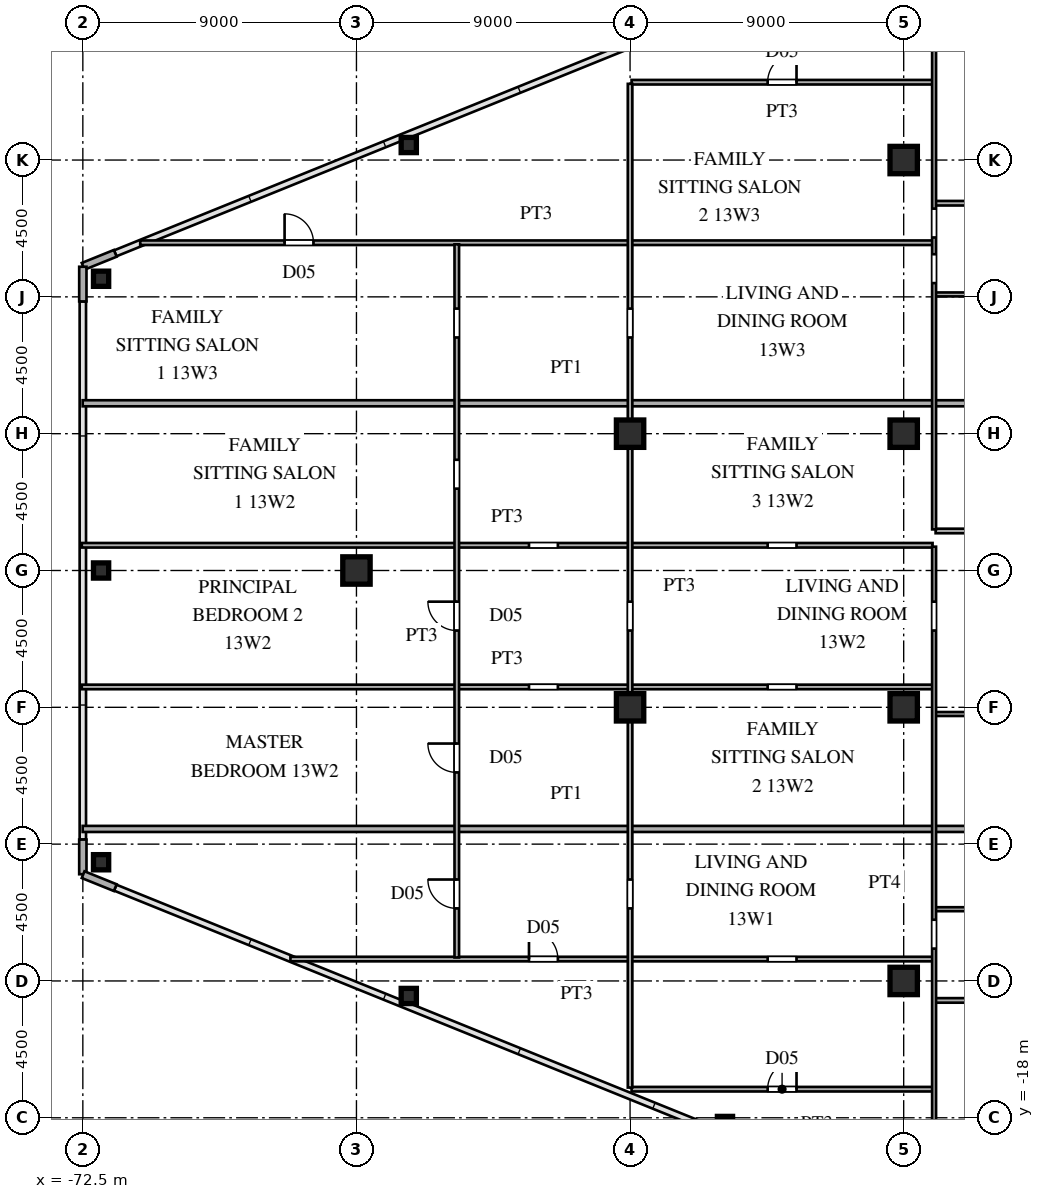
"""IFC4 building model, lengths in metres.
Left out: names, types, materials, properties, quantities, classifications, styles, units other than length and angle.
Written with IfcOpenShell. Run it as: python <this file> out.ifc"""

import sys

from ifc_helpers import new_model, si_unit, direction, frame, frame_2d, origin, origin_2d, place, context, subcontext, project, spatial, rectangle, hollow_rectangle, i_section, extrude, source, transform, mapped, element, fill, save


model = new_model("IFC4")
c1 = context("Model", 3, precision=1e-05, world=origin(), true_north=direction((0.0, 1.0)))
c2 = subcontext(c1, "Body", "Model", "MODEL_VIEW")
j1 = project(units=[si_unit("LENGTHUNIT", "METRE"), si_unit("PLANEANGLEUNIT", "RADIAN")], contexts=[c1])
p1 = place(None, origin())
s1 = spatial("IfcSite", under=j1, at=p1, CompositionType="ELEMENT")
p2 = place(p1, origin())
s2 = spatial("IfcBuilding", under=s1, at=p2, CompositionType="ELEMENT")
p3 = place(p2, frame((0.0, 0.0, 51.3)))
s3 = spatial("IfcBuildingStorey", under=s2, at=p3, CompositionType="ELEMENT", Elevation=51.3)
m1 = source(origin(), c2, "Body", "SweptSolid", [
    extrude(i_section(OverallWidth=0.9, OverallDepth=0.9, WebThickness=0.036, FlangeThickness=0.055, at=origin_2d()), origin(), (0.0, 0.0, 1.0), 3.6),
])
for number, where, z_axis, x_axis in (
    (1, (-45.5, -13.5, 0.0), (0.0, 0.0, 1.0), (1.0, 0.0, 0.0)),
    (2, (-45.5, -4.5, 0.0), (0.0, 0.0, 1.0), (1.0, 0.0, 0.0)),
    (3, (-45.5, 4.5, 0.0), (0.0, 0.0, 1.0), (1.0, 0.0, 0.0)),
    (4, (-45.5, 13.5, 0.0), (0.0, 0.0, 1.0), (1.0, 0.0, 0.0)),
    (5, (-54.5, -4.5, 0.0), (0.0, 0.0, 1.0), (1.0, 0.0, 0.0)),
    (6, (-54.5, 4.5, 0.0), (0.0, 0.0, 1.0), (1.0, 0.0, 0.0)),
    (7, (-63.5, 0.0, 0.0), (0.0, 0.0, 1.0), (1.0, 0.0, 0.0)),
):
    element("IfcColumn", number, at=place(p3, frame(where, z_axis=z_axis, x_axis=x_axis)), inside=s3, PredefinedType="COLUMN", context=c2, shape_type="MappedRepresentation", body=[
        mapped(m1, transform((0.0, 0.0, 0.0), scale=1.0)),
    ])
m2 = source(origin(), c2, "Body", "SweptSolid", [
    extrude(hollow_rectangle(XDim=0.5, YDim=0.5, WallThickness=0.02, at=origin_2d()), origin(), (0.0, 0.0, 1.0), 3.6),
])
for number, where, z_axis, x_axis in (
    (8, (-71.9, 9.596, 0.0), (0.0, 0.0, 1.0), (1.0, 0.0, 0.0)),
    (9, (-71.9, -9.596, 0.0), (0.0, 0.0, 1.0), (1.0, 0.0, 0.0)),
    (10, (-51.378, -18.204, 0.0), (0.0, 0.0, 1.0), (1.0, 0.0, 0.0)),
    (11, (-61.779, -13.994, 0.0), (0.0, 0.0, 1.0), (1.0, 0.0, 0.0)),
    (12, (-61.779, 13.994, 0.0), (0.0, 0.0, 1.0), (1.0, 0.0, 0.0)),
    (13, (-71.9, 0.0, 0.0), (0.0, 0.0, 1.0), (1.0, 0.0, 0.0)),
):
    element("IfcColumn", number, at=place(p3, frame(where, z_axis=z_axis, x_axis=x_axis)), inside=s3, PredefinedType="COLUMN", context=c2, shape_type="MappedRepresentation", body=[
        mapped(m2, transform((0.0, 0.0, 0.0), scale=1.0)),
    ])
for number, where, z_axis, x_axis in (
    (14, (-71.434, 10.431, 0.0), (0.0, 0.0, 1.0), (-0.927, -0.375, 0.0)),
    (15, (-72.5, 9.99, 0.0), (0.0, 0.0, 1.0), (0.0, -1.0, 0.0)),
    (16, (-72.5, -8.85, 0.0), (0.0, 0.0, 1.0), (0.0, -1.0, 0.0)),
    (17, (-72.491, -10.004, 0.0), (0.0, 0.0, 1.0), (0.927, -0.375, 0.0)),
):
    element("IfcWall", number, at=place(p3, frame(where, z_axis=z_axis, x_axis=x_axis)), inside=s3, PredefinedType="SOLIDWALL", context=c2, shape_type="SweptSolid", body=[
        extrude(rectangle(XDim=1.14, YDim=0.24, at=frame_2d((0.57, 0.0))), origin(), (0.0, 0.0, 1.0), 3.38),
    ])
p4 = place(p3, frame((-54.45, -17.06, 0.0), z_axis=(0.0, 0.0, 1.0), x_axis=(1.0, 0.0, 0.0)))
e18 = element("IfcWall", 18, at=p4, inside=s3, PredefinedType="PARTITIONING", context=c2, shape_type="SweptSolid", body=[
    extrude(rectangle(XDim=9.9, YDim=0.15, at=frame_2d((4.95, 0.0))), origin(), (0.0, 0.0, 1.0), 3.38),
])
p5 = place(p4, frame((4.475, 0.0, 0.0)))
e19 = element("IfcOpeningElement", 19, at=p5, cuts=e18, PredefinedType="OPENING", context=c2, shape_type="SweptSolid", body=[
    extrude(rectangle(XDim=0.95, YDim=2.15, at=frame_2d((0.475, 1.075))), frame((0.0, 0.085, 0.0), z_axis=(0.0, -1.0, 0.0), x_axis=(1.0, 0.0, 0.0)), (0.0, 0.0, 1.0), 0.17),
])
p6 = place(p3, frame((-44.45, -14.14, 0.0), z_axis=(0.0, 0.0, 1.0), x_axis=(1.0, 0.0, 0.0)))
e20 = element("IfcWall", 20, at=p6, inside=s3, PredefinedType="PARTITIONING", context=c2, shape_type="SweptSolid", body=[
    extrude(rectangle(XDim=6.1, YDim=0.15, at=frame_2d((3.05, 0.0))), origin(), (0.0, 0.0, 1.0), 3.38),
])
p7 = place(p6, frame((2.575, 0.0, 0.0)))
e21 = element("IfcOpeningElement", 21, at=p7, cuts=e20, PredefinedType="OPENING", context=c2, shape_type="SweptSolid", body=[
    extrude(rectangle(XDim=0.95, YDim=2.15, at=frame_2d((0.475, 1.075))), frame((0.0, 0.085, 0.0), z_axis=(0.0, -1.0, 0.0), x_axis=(1.0, 0.0, 0.0)), (0.0, 0.0, 1.0), 0.17),
])
p8 = place(p3, frame((-65.672, -12.78, 0.0), z_axis=(0.0, 0.0, 1.0), x_axis=(1.0, 0.0, 0.0)))
e22 = element("IfcWall", 22, at=p8, inside=s3, PredefinedType="PARTITIONING", context=c2, shape_type="SweptSolid", body=[
    extrude(rectangle(XDim=21.122, YDim=0.15, at=frame_2d((10.561, 0.0))), origin(), (0.0, 0.0, 1.0), 3.38),
])
p9 = place(p8, frame((15.697, 0.0, 0.0)))
e23 = element("IfcOpeningElement", 23, at=p9, cuts=e22, PredefinedType="OPENING", context=c2, shape_type="SweptSolid", body=[
    extrude(rectangle(XDim=0.95, YDim=2.15, at=frame_2d((0.475, 1.075))), frame((0.0, 0.085, 0.0), z_axis=(0.0, -1.0, 0.0), x_axis=(1.0, 0.0, 0.0)), (0.0, 0.0, 1.0), 0.17),
])
p10 = place(p8, frame((7.847, 0.0, 0.0)))
e24 = element("IfcOpeningElement", 24, at=p10, cuts=e22, PredefinedType="OPENING", context=c2, shape_type="SweptSolid", body=[
    extrude(rectangle(XDim=0.95, YDim=2.15, at=frame_2d((0.475, 1.075))), frame((0.0, 0.085, 0.0), z_axis=(0.0, -1.0, 0.0), x_axis=(1.0, 0.0, 0.0)), (0.0, 0.0, 1.0), 0.17),
])
p11 = place(p3, frame((-44.45, -11.14, 0.0), z_axis=(0.0, 0.0, 1.0), x_axis=(1.0, 0.0, 0.0)))
e25 = element("IfcWall", 25, at=p11, inside=s3, PredefinedType="PARTITIONING", context=c2, shape_type="SweptSolid", body=[
    extrude(rectangle(XDim=6.1, YDim=0.13, at=frame_2d((3.05, 0.0))), origin(), (0.0, 0.0, 1.0), 3.38),
])
p12 = place(p11, frame((2.61, 0.0, 0.0)))
e26 = element("IfcOpeningElement", 26, at=p12, cuts=e25, PredefinedType="OPENING", context=c2, shape_type="SweptSolid", body=[
    extrude(rectangle(XDim=0.88, YDim=2.1, at=frame_2d((0.44, 1.05))), frame((0.0, 0.075, 0.0), z_axis=(0.0, -1.0, 0.0), x_axis=(1.0, 0.0, 0.0)), (0.0, 0.0, 1.0), 0.15),
])
p13 = place(p3, frame((-72.505, -8.5, 0.0), z_axis=(0.0, 0.0, 1.0), x_axis=(1.0, 0.0, 0.0)))
e27 = element("IfcWall", 27, at=p13, inside=s3, PredefinedType="PARTITIONING", context=c2, shape_type="SweptSolid", body=[
    extrude(rectangle(XDim=34.125, YDim=0.2, at=frame_2d((17.062, 0.0))), origin(), (0.0, 0.0, 1.0), 3.38),
])
p14 = place(p3, frame((-44.45, -4.72, 0.0), z_axis=(0.0, 0.0, 1.0), x_axis=(1.0, 0.0, 0.0)))
e28 = element("IfcWall", 28, at=p14, inside=s3, PredefinedType="PARTITIONING", context=c2, shape_type="SweptSolid", body=[
    extrude(rectangle(XDim=6.1, YDim=0.13, at=frame_2d((3.05, 0.0))), origin(), (0.0, 0.0, 1.0), 3.38),
])
p15 = place(p14, frame((2.61, 0.0, 0.0)))
e29 = element("IfcOpeningElement", 29, at=p15, cuts=e28, PredefinedType="OPENING", context=c2, shape_type="SweptSolid", body=[
    extrude(rectangle(XDim=0.88, YDim=2.1, at=frame_2d((0.44, 1.05))), frame((0.0, 0.075, 0.0), z_axis=(0.0, -1.0, 0.0), x_axis=(1.0, 0.0, 0.0)), (0.0, 0.0, 1.0), 0.15),
])
p16 = place(p3, frame((-72.535, -3.83, 0.0), z_axis=(0.0, 0.0, 1.0), x_axis=(1.0, 0.0, 0.0)))
e30 = element("IfcWall", 30, at=p16, inside=s3, PredefinedType="PARTITIONING", context=c2, shape_type="SweptSolid", body=[
    extrude(rectangle(XDim=27.985, YDim=0.15, at=frame_2d((13.992, 0.0))), origin(), (0.0, 0.0, 1.0), 3.38),
])
p17 = place(p16, frame((22.56, 0.0, 0.0)))
e31 = element("IfcOpeningElement", 31, at=p17, cuts=e30, PredefinedType="OPENING", context=c2, shape_type="SweptSolid", body=[
    extrude(rectangle(XDim=0.95, YDim=2.15, at=frame_2d((0.475, 1.075))), frame((0.0, 0.085, 0.0), z_axis=(0.0, -1.0, 0.0), x_axis=(1.0, 0.0, 0.0)), (0.0, 0.0, 1.0), 0.17),
])
p18 = place(p16, frame((14.71, 0.0, 0.0)))
e32 = element("IfcOpeningElement", 32, at=p18, cuts=e30, PredefinedType="OPENING", context=c2, shape_type="SweptSolid", body=[
    extrude(rectangle(XDim=0.95, YDim=2.15, at=frame_2d((0.475, 1.075))), frame((0.0, 0.085, 0.0), z_axis=(0.0, -1.0, 0.0), x_axis=(1.0, 0.0, 0.0)), (0.0, 0.0, 1.0), 0.17),
])
p19 = place(p3, frame((-72.535, 0.83, 0.0), z_axis=(0.0, 0.0, 1.0), x_axis=(1.0, 0.0, 0.0)))
e33 = element("IfcWall", 33, at=p19, inside=s3, PredefinedType="PARTITIONING", context=c2, shape_type="SweptSolid", body=[
    extrude(rectangle(XDim=27.985, YDim=0.15, at=frame_2d((13.992, 0.0))), origin(), (0.0, 0.0, 1.0), 3.38),
])
p20 = place(p19, frame((22.56, 0.0, 0.0)))
e34 = element("IfcOpeningElement", 34, at=p20, cuts=e33, PredefinedType="OPENING", context=c2, shape_type="SweptSolid", body=[
    extrude(rectangle(XDim=0.95, YDim=2.15, at=frame_2d((0.475, 1.075))), frame((0.0, 0.085, 0.0), z_axis=(0.0, -1.0, 0.0), x_axis=(1.0, 0.0, 0.0)), (0.0, 0.0, 1.0), 0.17),
])
p21 = place(p19, frame((14.71, 0.0, 0.0)))
e35 = element("IfcOpeningElement", 35, at=p21, cuts=e33, PredefinedType="OPENING", context=c2, shape_type="SweptSolid", body=[
    extrude(rectangle(XDim=0.95, YDim=2.15, at=frame_2d((0.475, 1.075))), frame((0.0, 0.085, 0.0), z_axis=(0.0, -1.0, 0.0), x_axis=(1.0, 0.0, 0.0)), (0.0, 0.0, 1.0), 0.17),
])
p22 = place(p3, frame((-44.45, 1.3, 0.0), z_axis=(0.0, 0.0, 1.0), x_axis=(1.0, 0.0, 0.0)))
e36 = element("IfcWall", 36, at=p22, inside=s3, PredefinedType="PARTITIONING", context=c2, shape_type="SweptSolid", body=[
    extrude(rectangle(XDim=6.1, YDim=0.15, at=frame_2d((3.05, 0.0))), origin(), (0.0, 0.0, 1.0), 3.38),
])
p23 = place(p22, frame((2.575, 0.0, 0.0)))
e37 = element("IfcOpeningElement", 37, at=p23, cuts=e36, PredefinedType="OPENING", context=c2, shape_type="SweptSolid", body=[
    extrude(rectangle(XDim=0.95, YDim=2.15, at=frame_2d((0.475, 1.075))), frame((0.0, 0.085, 0.0), z_axis=(0.0, -1.0, 0.0), x_axis=(1.0, 0.0, 0.0)), (0.0, 0.0, 1.0), 0.17),
])
p24 = place(p3, frame((-72.505, 5.5, 0.0), z_axis=(0.0, 0.0, 1.0), x_axis=(1.0, 0.0, 0.0)))
e38 = element("IfcWall", 38, at=p24, inside=s3, PredefinedType="PARTITIONING", context=c2, shape_type="SweptSolid", body=[
    extrude(rectangle(XDim=34.125, YDim=0.2, at=frame_2d((17.062, 0.0))), origin(), (0.0, 0.0, 1.0), 3.38),
])
p25 = place(p3, frame((-44.45, 9.08, 0.0), z_axis=(0.0, 0.0, 1.0), x_axis=(1.0, 0.0, 0.0)))
e39 = element("IfcWall", 39, at=p25, inside=s3, PredefinedType="PARTITIONING", context=c2, shape_type="SweptSolid", body=[
    extrude(rectangle(XDim=6.1, YDim=0.13, at=frame_2d((3.05, 0.0))), origin(), (0.0, 0.0, 1.0), 3.38),
])
p26 = place(p25, frame((2.61, 0.0, 0.0)))
e40 = element("IfcOpeningElement", 40, at=p26, cuts=e39, PredefinedType="OPENING", context=c2, shape_type="SweptSolid", body=[
    extrude(rectangle(XDim=0.88, YDim=2.1, at=frame_2d((0.44, 1.05))), frame((0.0, 0.075, 0.0), z_axis=(0.0, -1.0, 0.0), x_axis=(1.0, 0.0, 0.0)), (0.0, 0.0, 1.0), 0.15),
])
p27 = place(p3, frame((-70.613, 10.78, 0.0), z_axis=(0.0, 0.0, 1.0), x_axis=(1.0, 0.0, 0.0)))
e41 = element("IfcWall", 41, at=p27, inside=s3, PredefinedType="PARTITIONING", context=c2, shape_type="SweptSolid", body=[
    extrude(rectangle(XDim=26.063, YDim=0.15, at=frame_2d((13.031, 0.0))), origin(), (0.0, 0.0, 1.0), 3.38),
])
p28 = place(p27, frame((4.749, 0.0, 0.0)))
e42 = element("IfcOpeningElement", 42, at=p28, cuts=e41, PredefinedType="OPENING", context=c2, shape_type="SweptSolid", body=[
    extrude(rectangle(XDim=0.95, YDim=2.15, at=frame_2d((0.475, 1.075))), frame((0.0, 0.085, 0.0), z_axis=(0.0, -1.0, 0.0), x_axis=(1.0, 0.0, 0.0)), (0.0, 0.0, 1.0), 0.17),
])
p29 = place(p3, frame((-44.45, 12.08, 0.0), z_axis=(0.0, 0.0, 1.0), x_axis=(1.0, 0.0, 0.0)))
e43 = element("IfcWall", 43, at=p29, inside=s3, PredefinedType="PARTITIONING", context=c2, shape_type="SweptSolid", body=[
    extrude(rectangle(XDim=6.1, YDim=0.15, at=frame_2d((3.05, 0.0))), origin(), (0.0, 0.0, 1.0), 3.38),
])
p30 = place(p29, frame((2.575, 0.0, 0.0)))
e44 = element("IfcOpeningElement", 44, at=p30, cuts=e43, PredefinedType="OPENING", context=c2, shape_type="SweptSolid", body=[
    extrude(rectangle(XDim=0.95, YDim=2.15, at=frame_2d((0.475, 1.075))), frame((0.0, 0.085, 0.0), z_axis=(0.0, -1.0, 0.0), x_axis=(1.0, 0.0, 0.0)), (0.0, 0.0, 1.0), 0.17),
])
p31 = place(p3, frame((-54.45, 16.06, 0.0), z_axis=(0.0, 0.0, 1.0), x_axis=(1.0, 0.0, 0.0)))
e45 = element("IfcWall", 45, at=p31, inside=s3, PredefinedType="PARTITIONING", context=c2, shape_type="SweptSolid", body=[
    extrude(rectangle(XDim=9.9, YDim=0.15, at=frame_2d((4.95, 0.0))), origin(), (0.0, 0.0, 1.0), 3.38),
])
p32 = place(p31, frame((4.475, 0.0, 0.0)))
e46 = element("IfcOpeningElement", 46, at=p32, cuts=e45, PredefinedType="OPENING", context=c2, shape_type="SweptSolid", body=[
    extrude(rectangle(XDim=0.95, YDim=2.15, at=frame_2d((0.475, 1.075))), frame((0.0, 0.085, 0.0), z_axis=(0.0, -1.0, 0.0), x_axis=(1.0, 0.0, 0.0)), (0.0, 0.0, 1.0), 0.17),
])
p33 = place(p3, frame((-60.2, -12.728, 0.0), z_axis=(0.0, 0.0, 1.0), x_axis=(0.0, 1.0, 0.0)))
e47 = element("IfcWall", 47, at=p33, inside=s3, PredefinedType="PARTITIONING", context=c2, shape_type="SweptSolid", body=[
    extrude(rectangle(XDim=23.456, YDim=0.15, at=frame_2d((11.728, 0.0))), origin(), (0.0, 0.0, 1.0), 3.38),
])
p34 = place(p33, frame((1.614, 0.0, 0.0)))
e48 = element("IfcOpeningElement", 48, at=p34, cuts=e47, PredefinedType="OPENING", context=c2, shape_type="SweptSolid", body=[
    extrude(rectangle(XDim=0.95, YDim=2.15, at=frame_2d((0.475, 1.075))), frame((0.0, 0.085, 0.0), z_axis=(0.0, -1.0, 0.0), x_axis=(1.0, 0.0, 0.0)), (0.0, 0.0, 1.0), 0.17),
])
p35 = place(p33, frame((6.086, 0.0, 0.0)))
e49 = element("IfcOpeningElement", 49, at=p35, cuts=e47, PredefinedType="OPENING", context=c2, shape_type="SweptSolid", body=[
    extrude(rectangle(XDim=0.95, YDim=2.15, at=frame_2d((0.475, 1.075))), frame((0.0, 0.085, 0.0), z_axis=(0.0, -1.0, 0.0), x_axis=(1.0, 0.0, 0.0)), (0.0, 0.0, 1.0), 0.17),
])
p36 = place(p33, frame((10.753, 0.0, 0.0)))
e50 = element("IfcOpeningElement", 50, at=p36, cuts=e47, PredefinedType="OPENING", context=c2, shape_type="SweptSolid", body=[
    extrude(rectangle(XDim=0.95, YDim=2.15, at=frame_2d((0.475, 1.075))), frame((0.0, 0.085, 0.0), z_axis=(0.0, -1.0, 0.0), x_axis=(1.0, 0.0, 0.0)), (0.0, 0.0, 1.0), 0.17),
])
p37 = place(p33, frame((15.42, 0.0, 0.0)))
e51 = element("IfcOpeningElement", 51, at=p37, cuts=e47, PredefinedType="OPENING", context=c2, shape_type="SweptSolid", body=[
    extrude(rectangle(XDim=0.95, YDim=2.15, at=frame_2d((0.475, 1.075))), frame((0.0, 0.085, 0.0), z_axis=(0.0, -1.0, 0.0), x_axis=(1.0, 0.0, 0.0)), (0.0, 0.0, 1.0), 0.17),
])
p38 = place(p33, frame((20.392, 0.0, 0.0)))
e52 = element("IfcOpeningElement", 52, at=p38, cuts=e47, PredefinedType="OPENING", context=c2, shape_type="SweptSolid", body=[
    extrude(rectangle(XDim=0.95, YDim=2.15, at=frame_2d((0.475, 1.075))), frame((0.0, 0.085, 0.0), z_axis=(0.0, -1.0, 0.0), x_axis=(1.0, 0.0, 0.0)), (0.0, 0.0, 1.0), 0.17),
])
p39 = place(p3, frame((-54.5, -17.006, 0.0), z_axis=(0.0, 0.0, 1.0), x_axis=(0.0, 1.0, 0.0)))
e53 = element("IfcWall", 53, at=p39, inside=s3, PredefinedType="PARTITIONING", context=c2, shape_type="SweptSolid", body=[
    extrude(rectangle(XDim=33.012, YDim=0.15, at=frame_2d((16.506, 0.0))), origin(), (0.0, 0.0, 1.0), 2.68),
])
p40 = place(p39, frame((5.892, 0.0, 0.0)))
e54 = element("IfcOpeningElement", 54, at=p40, cuts=e53, PredefinedType="OPENING", context=c2, shape_type="SweptSolid", body=[
    extrude(rectangle(XDim=0.95, YDim=2.15, at=frame_2d((0.475, 1.075))), frame((0.0, 0.085, 0.0), z_axis=(0.0, -1.0, 0.0), x_axis=(1.0, 0.0, 0.0)), (0.0, 0.0, 1.0), 0.17),
])
p41 = place(p39, frame((15.031, 0.0, 0.0)))
e55 = element("IfcOpeningElement", 55, at=p41, cuts=e53, PredefinedType="OPENING", context=c2, shape_type="SweptSolid", body=[
    extrude(rectangle(XDim=0.95, YDim=2.15, at=frame_2d((0.475, 1.075))), frame((0.0, 0.085, 0.0), z_axis=(0.0, -1.0, 0.0), x_axis=(1.0, 0.0, 0.0)), (0.0, 0.0, 1.0), 0.17),
])
p42 = place(p39, frame((24.67, 0.0, 0.0)))
e56 = element("IfcOpeningElement", 56, at=p42, cuts=e53, PredefinedType="OPENING", context=c2, shape_type="SweptSolid", body=[
    extrude(rectangle(XDim=0.95, YDim=2.15, at=frame_2d((0.475, 1.075))), frame((0.0, 0.085, 0.0), z_axis=(0.0, -1.0, 0.0), x_axis=(1.0, 0.0, 0.0)), (0.0, 0.0, 1.0), 0.17),
])
p43 = place(p3, frame((-44.5, -21.368, 0.0), z_axis=(0.0, 0.0, 1.0), x_axis=(0.0, 1.0, 0.0)))
e57 = element("IfcWall", 57, at=p43, inside=s3, PredefinedType="PARTITIONING", context=c2, shape_type="SweptSolid", body=[
    extrude(rectangle(XDim=22.151, YDim=0.13, at=frame_2d((11.075, 0.0))), origin(), (0.0, 0.0, 1.0), 3.38),
])
p44 = place(p43, frame((8.932, 0.0, 0.0)))
e58 = element("IfcOpeningElement", 58, at=p44, cuts=e57, PredefinedType="OPENING", context=c2, shape_type="SweptSolid", body=[
    extrude(rectangle(XDim=0.95, YDim=2.15, at=frame_2d((0.475, 1.075))), frame((0.0, 0.075, 0.0), z_axis=(0.0, -1.0, 0.0), x_axis=(1.0, 0.0, 0.0)), (0.0, 0.0, 1.0), 0.15),
])
p45 = place(p43, frame((0.724, 0.0, 0.0)))
e59 = element("IfcOpeningElement", 59, at=p45, cuts=e57, PredefinedType="OPENING", context=c2, shape_type="SweptSolid", body=[
    extrude(rectangle(XDim=0.95, YDim=2.15, at=frame_2d((0.475, 1.075))), frame((0.0, 0.075, 0.0), z_axis=(0.0, -1.0, 0.0), x_axis=(1.0, 0.0, 0.0)), (0.0, 0.0, 1.0), 0.15),
])
p46 = place(p43, frame((19.393, 0.0, 0.0)))
e60 = element("IfcOpeningElement", 60, at=p46, cuts=e57, PredefinedType="OPENING", context=c2, shape_type="SweptSolid", body=[
    extrude(rectangle(XDim=0.95, YDim=2.15, at=frame_2d((0.475, 1.075))), frame((0.0, 0.075, 0.0), z_axis=(0.0, -1.0, 0.0), x_axis=(1.0, 0.0, 0.0)), (0.0, 0.0, 1.0), 0.15),
])
p47 = place(p3, frame((-44.5, 1.352, 0.0), z_axis=(0.0, 0.0, 1.0), x_axis=(0.0, 1.0, 0.0)))
e61 = element("IfcWall", 61, at=p47, inside=s3, PredefinedType="PARTITIONING", context=c2, shape_type="SweptSolid", body=[
    extrude(rectangle(XDim=20.016, YDim=0.13, at=frame_2d((10.008, 0.0))), origin(), (0.0, 0.0, 1.0), 3.38),
])
p48 = place(p47, frame((8.101, 0.0, 0.0)))
e62 = element("IfcOpeningElement", 62, at=p48, cuts=e61, PredefinedType="OPENING", context=c2, shape_type="SweptSolid", body=[
    extrude(rectangle(XDim=0.95, YDim=2.15, at=frame_2d((0.475, 1.075))), frame((0.0, 0.075, 0.0), z_axis=(0.0, -1.0, 0.0), x_axis=(1.0, 0.0, 0.0)), (0.0, 0.0, 1.0), 0.15),
])
p49 = place(p47, frame((9.601, 0.0, 0.0)))
e63 = element("IfcOpeningElement", 63, at=p49, cuts=e61, PredefinedType="OPENING", context=c2, shape_type="SweptSolid", body=[
    extrude(rectangle(XDim=0.95, YDim=2.15, at=frame_2d((0.475, 1.075))), frame((0.0, 0.075, 0.0), z_axis=(0.0, -1.0, 0.0), x_axis=(1.0, 0.0, 0.0)), (0.0, 0.0, 1.0), 0.15),
])
m3 = source(origin(), c2, "Body", "SweptSolid", [
    extrude(rectangle(XDim=0.95, YDim=2.15, at=frame_2d((0.475, 1.075))), frame((0.0, 0.025, 0.0), z_axis=(0.0, -1.0, 0.0), x_axis=(1.0, 0.0, 0.0)), (0.0, 0.0, 1.0), 0.05),
])
p50 = place(p5, origin())
e64 = element("IfcDoor", 64, at=p50, inside=s3, OperationType="SINGLE_SWING_RIGHT", PredefinedType="DOOR", context=c2, shape_type="MappedRepresentation", body=[
    mapped(m3, transform((0.0, 0.0, 0.0), scale=1.0)),
])
fill(e19, e64)
p51 = place(p10, origin())
e65 = element("IfcDoor", 65, at=p51, inside=s3, OperationType="SINGLE_SWING_LEFT", PredefinedType="DOOR", context=c2, shape_type="MappedRepresentation", body=[
    mapped(m3, transform((0.0, 0.0, 0.0), scale=1.0)),
])
fill(e24, e65)
p52 = place(p28, origin())
e66 = element("IfcDoor", 66, at=p52, inside=s3, OperationType="SINGLE_SWING_LEFT", PredefinedType="DOOR", context=c2, shape_type="MappedRepresentation", body=[
    mapped(m3, transform((0.0, 0.0, 0.0), scale=1.0)),
])
fill(e42, e66)
p53 = place(p32, origin())
e67 = element("IfcDoor", 67, at=p53, inside=s3, OperationType="SINGLE_SWING_RIGHT", PredefinedType="DOOR", context=c2, shape_type="MappedRepresentation", body=[
    mapped(m3, transform((0.0, 0.0, 0.0), scale=1.0)),
])
fill(e46, e67)
p54 = place(p34, origin())
e68 = element("IfcDoor", 68, at=p54, inside=s3, OperationType="SINGLE_SWING_RIGHT", PredefinedType="DOOR", context=c2, shape_type="MappedRepresentation", body=[
    mapped(m3, transform((0.0, 0.0, 0.0), scale=1.0)),
])
fill(e48, e68)
p55 = place(p35, origin())
e69 = element("IfcDoor", 69, at=p55, inside=s3, OperationType="SINGLE_SWING_RIGHT", PredefinedType="DOOR", context=c2, shape_type="MappedRepresentation", body=[
    mapped(m3, transform((0.0, 0.0, 0.0), scale=1.0)),
])
fill(e49, e69)
p56 = place(p36, origin())
e70 = element("IfcDoor", 70, at=p56, inside=s3, OperationType="SINGLE_SWING_RIGHT", PredefinedType="DOOR", context=c2, shape_type="MappedRepresentation", body=[
    mapped(m3, transform((0.0, 0.0, 0.0), scale=1.0)),
])
fill(e50, e70)
save(model, sys.argv[1])
